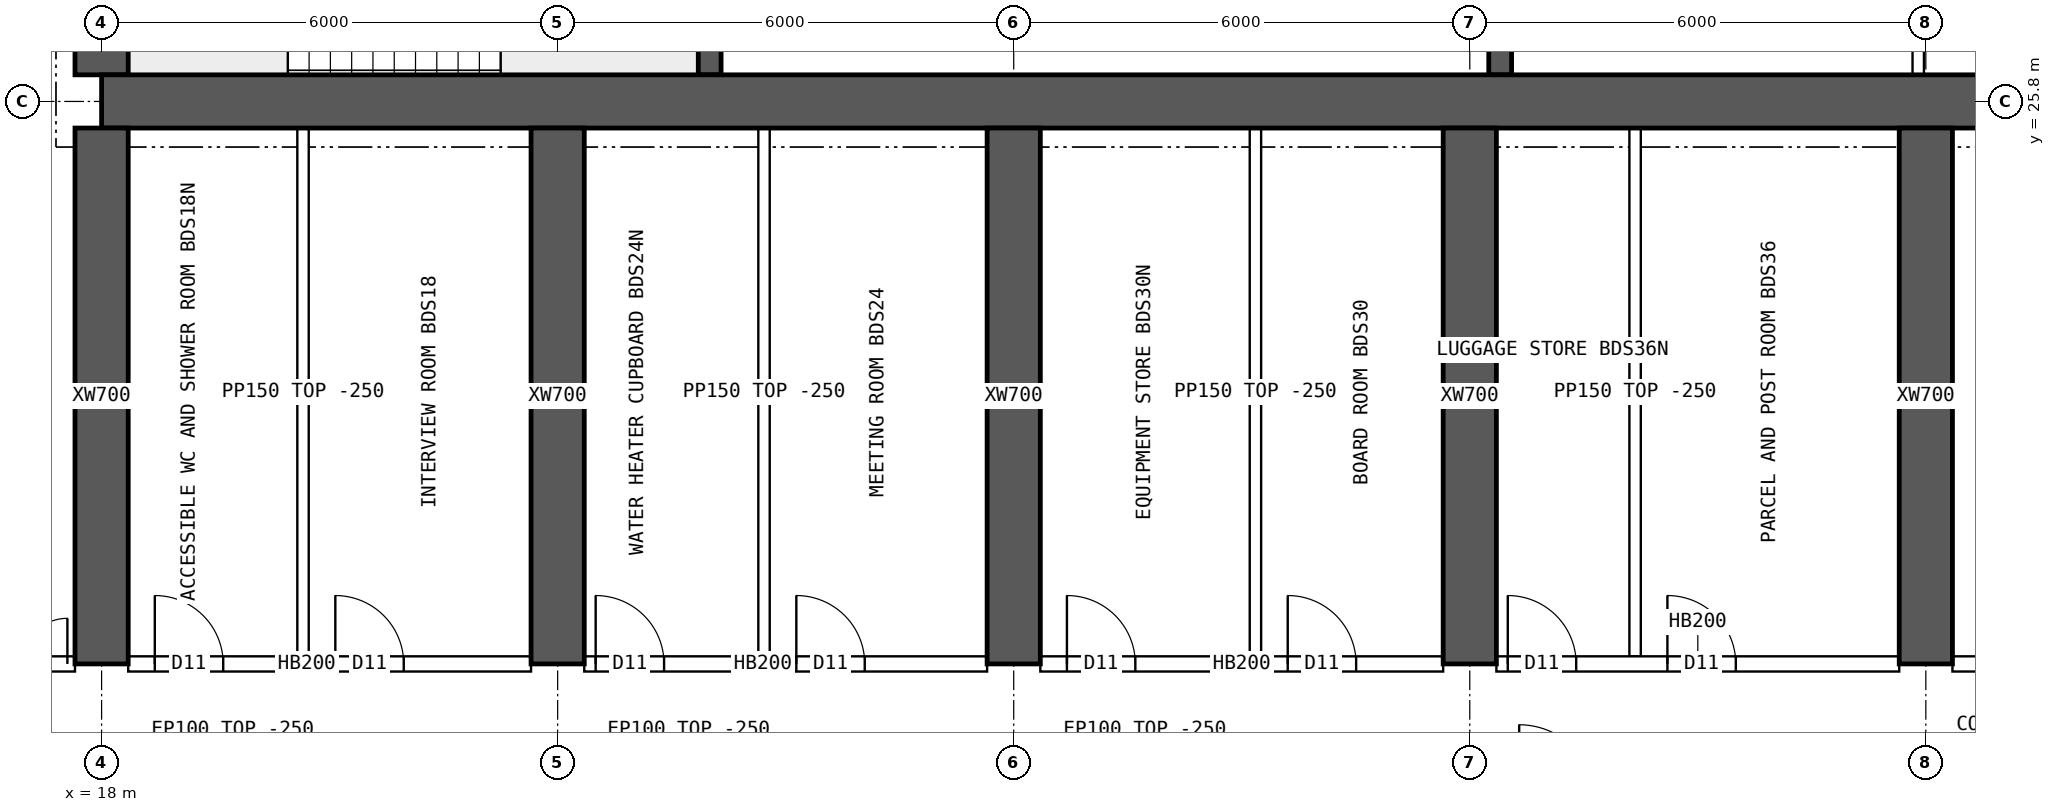
"""IFC4 building model, lengths in metres.
Left out: names, types, materials, properties, quantities, classifications, styles, units other than length and angle.
Written with IfcOpenShell. Run it as: python <this file> out.ifc"""

import sys

from ifc_helpers import new_model, si_unit, direction, frame, frame_2d, origin, place, context, subcontext, project, spatial, rectangle, extrude, element, fill, save


model = new_model("IFC4")
c1 = context("Model", 3, precision=1e-05, world=origin(), true_north=direction((0.0, 1.0)))
c2 = subcontext(c1, "Body", "Model", "MODEL_VIEW")
j1 = project(units=[si_unit("LENGTHUNIT", "METRE"), si_unit("PLANEANGLEUNIT", "RADIAN")], contexts=[c1])
p1 = place(None, origin())
s1 = spatial("IfcSite", under=j1, at=p1, CompositionType="ELEMENT")
p2 = place(p1, origin())
s2 = spatial("IfcBuilding", under=s1, at=p2, CompositionType="ELEMENT")
p3 = place(p2, frame((0.0, 0.0, 235.3)))
s3 = spatial("IfcBuildingStorey", under=s2, at=p3, CompositionType="ELEMENT", Elevation=235.3)
p4 = place(p3, frame((18.0, 25.8, 0.0), z_axis=(0.0, 0.0, 1.0), x_axis=(1.0, 0.0, 0.0)))
e1 = element("IfcWall", 1, at=p4, inside=s3, PredefinedType="SHEAR", context=c2, shape_type="SweptSolid", body=[
    extrude(rectangle(XDim=48.0, YDim=0.7, at=frame_2d((24.0, 0.0))), origin(), (0.0, 0.0, 1.0), 3.75),
])
p5 = place(p3, frame((18.0, 26.15, 0.0), z_axis=(0.0, 0.0, 1.0), x_axis=(0.0, 1.0, 0.0)))
e2 = element("IfcWall", 2, at=p5, inside=s3, PredefinedType="SHEAR", context=c2, shape_type="SweptSolid", body=[
    extrude(rectangle(XDim=11.7, YDim=0.7, at=frame_2d((5.85, 0.0))), origin(), (0.0, 0.0, 1.0), 3.75),
])
p6 = place(p5, frame((5.15, 0.0, 0.0)))
e3 = element("IfcOpeningElement", 3, at=p6, cuts=e2, PredefinedType="OPENING", context=c2, shape_type="SweptSolid", body=[
    extrude(rectangle(XDim=1.2, YDim=2.1, at=frame_2d((0.6, 1.05))), frame((0.0, 0.36, 0.0), z_axis=(0.0, -1.0, 0.0), x_axis=(1.0, 0.0, 0.0)), (0.0, 0.0, 1.0), 0.72),
])
for number, where, z_axis, x_axis in (
    (4, (26.0, 26.15, 0.0), (0.0, 0.0, 1.0), (0.0, 1.0, 0.0)),
    (5, (36.4, 26.15, 0.0), (0.0, 0.0, 1.0), (0.0, 1.0, 0.0)),
):
    element("IfcWall", number, at=place(p3, frame(where, z_axis=z_axis, x_axis=x_axis)), inside=s3, PredefinedType="SHEAR", context=c2, shape_type="SweptSolid", body=[
        extrude(rectangle(XDim=4.1, YDim=0.3, at=frame_2d((2.05, 0.0))), origin(), (0.0, 0.0, 1.0), 3.75),
    ])
for number, where, z_axis, x_axis in (
    (6, (18.0, 18.4, 0.0), (0.0, 0.0, 1.0), (0.0, 1.0, 0.0)),
    (7, (24.0, 18.4, 0.0), (0.0, 0.0, 1.0), (0.0, 1.0, 0.0)),
    (8, (30.0, 18.4, 0.0), (0.0, 0.0, 1.0), (0.0, 1.0, 0.0)),
    (9, (36.0, 18.4, 0.0), (0.0, 0.0, 1.0), (0.0, 1.0, 0.0)),
    (10, (42.0, 18.4, 0.0), (0.0, 0.0, 1.0), (0.0, 1.0, 0.0)),
):
    element("IfcWall", number, at=place(p3, frame(where, z_axis=z_axis, x_axis=x_axis)), inside=s3, PredefinedType="SHEAR", context=c2, shape_type="SweptSolid", body=[
        extrude(rectangle(XDim=7.05, YDim=0.7, at=frame_2d((3.525, 0.0))), origin(), (0.0, 0.0, 1.0), 3.75),
    ])
p7 = place(p3, frame((41.9, 26.15, 0.0), z_axis=(0.0, 0.0, 1.0), x_axis=(0.0, 1.0, 0.0)))
e11 = element("IfcWall", 11, at=p7, inside=s3, PredefinedType="SOLIDWALL", context=c2, shape_type="SweptSolid", body=[
    extrude(rectangle(XDim=4.1, YDim=0.15, at=frame_2d((2.05, 0.0))), origin(), (0.0, 0.0, 1.0), 3.5),
])
p8 = place(p3, frame((15.6, 18.4, 0.0), z_axis=(0.0, 0.0, 1.0), x_axis=(1.0, 0.0, 0.0)))
e12 = element("IfcWall", 12, at=p8, inside=s3, PredefinedType="SOLIDWALL", context=c2, shape_type="SweptSolid", body=[
    extrude(rectangle(XDim=2.05, YDim=0.2, at=frame_2d((1.025, 0.0))), origin(), (0.0, 0.0, 1.0), 3.5),
])
p9 = place(p8, frame((0.75, 0.0, 0.0)))
e13 = element("IfcOpeningElement", 13, at=p9, cuts=e12, PredefinedType="OPENING", context=c2, shape_type="SweptSolid", body=[
    extrude(rectangle(XDim=1.2, YDim=2.1, at=frame_2d((0.6, 1.05))), frame((0.0, 0.11, 0.0), z_axis=(0.0, -1.0, 0.0), x_axis=(1.0, 0.0, 0.0)), (0.0, 0.0, 1.0), 0.22),
])
p10 = place(p3, frame((18.35, 18.4, 0.0), z_axis=(0.0, 0.0, 1.0), x_axis=(1.0, 0.0, 0.0)))
e14 = element("IfcWall", 14, at=p10, inside=s3, PredefinedType="SOLIDWALL", context=c2, shape_type="SweptSolid", body=[
    extrude(rectangle(XDim=5.3, YDim=0.2, at=frame_2d((2.65, 0.0))), origin(), (0.0, 0.0, 1.0), 3.5),
])
p11 = place(p10, frame((0.35, 0.0, 0.0)))
e15 = element("IfcOpeningElement", 15, at=p11, cuts=e14, PredefinedType="OPENING", context=c2, shape_type="SweptSolid", body=[
    extrude(rectangle(XDim=0.9, YDim=2.1, at=frame_2d((0.45, 1.05))), frame((0.0, 0.11, 0.0), z_axis=(0.0, -1.0, 0.0), x_axis=(1.0, 0.0, 0.0)), (0.0, 0.0, 1.0), 0.22),
])
p12 = place(p10, frame((2.725, 0.0, 0.0)))
e16 = element("IfcOpeningElement", 16, at=p12, cuts=e14, PredefinedType="OPENING", context=c2, shape_type="SweptSolid", body=[
    extrude(rectangle(XDim=0.9, YDim=2.1, at=frame_2d((0.45, 1.05))), frame((0.0, 0.11, 0.0), z_axis=(0.0, -1.0, 0.0), x_axis=(1.0, 0.0, 0.0)), (0.0, 0.0, 1.0), 0.22),
])
p13 = place(p3, frame((24.35, 18.4, 0.0), z_axis=(0.0, 0.0, 1.0), x_axis=(1.0, 0.0, 0.0)))
e17 = element("IfcWall", 17, at=p13, inside=s3, PredefinedType="SOLIDWALL", context=c2, shape_type="SweptSolid", body=[
    extrude(rectangle(XDim=5.3, YDim=0.2, at=frame_2d((2.65, 0.0))), origin(), (0.0, 0.0, 1.0), 3.5),
])
p14 = place(p13, frame((0.15, 0.0, 0.0)))
e18 = element("IfcOpeningElement", 18, at=p14, cuts=e17, PredefinedType="OPENING", context=c2, shape_type="SweptSolid", body=[
    extrude(rectangle(XDim=0.9, YDim=2.1, at=frame_2d((0.45, 1.05))), frame((0.0, 0.11, 0.0), z_axis=(0.0, -1.0, 0.0), x_axis=(1.0, 0.0, 0.0)), (0.0, 0.0, 1.0), 0.22),
])
p15 = place(p13, frame((2.79, 0.0, 0.0)))
e19 = element("IfcOpeningElement", 19, at=p15, cuts=e17, PredefinedType="OPENING", context=c2, shape_type="SweptSolid", body=[
    extrude(rectangle(XDim=0.9, YDim=2.1, at=frame_2d((0.45, 1.05))), frame((0.0, 0.11, 0.0), z_axis=(0.0, -1.0, 0.0), x_axis=(1.0, 0.0, 0.0)), (0.0, 0.0, 1.0), 0.22),
])
p16 = place(p3, frame((30.35, 18.4, 0.0), z_axis=(0.0, 0.0, 1.0), x_axis=(1.0, 0.0, 0.0)))
e20 = element("IfcWall", 20, at=p16, inside=s3, PredefinedType="SOLIDWALL", context=c2, shape_type="SweptSolid", body=[
    extrude(rectangle(XDim=5.3, YDim=0.2, at=frame_2d((2.65, 0.0))), origin(), (0.0, 0.0, 1.0), 3.5),
])
p17 = place(p16, frame((0.35, 0.0, 0.0)))
e21 = element("IfcOpeningElement", 21, at=p17, cuts=e20, PredefinedType="OPENING", context=c2, shape_type="SweptSolid", body=[
    extrude(rectangle(XDim=0.9, YDim=2.1, at=frame_2d((0.45, 1.05))), frame((0.0, 0.11, 0.0), z_axis=(0.0, -1.0, 0.0), x_axis=(1.0, 0.0, 0.0)), (0.0, 0.0, 1.0), 0.22),
])
p18 = place(p16, frame((3.255, 0.0, 0.0)))
e22 = element("IfcOpeningElement", 22, at=p18, cuts=e20, PredefinedType="OPENING", context=c2, shape_type="SweptSolid", body=[
    extrude(rectangle(XDim=0.9, YDim=2.1, at=frame_2d((0.45, 1.05))), frame((0.0, 0.11, 0.0), z_axis=(0.0, -1.0, 0.0), x_axis=(1.0, 0.0, 0.0)), (0.0, 0.0, 1.0), 0.22),
])
p19 = place(p3, frame((36.35, 18.4, 0.0), z_axis=(0.0, 0.0, 1.0), x_axis=(1.0, 0.0, 0.0)))
e23 = element("IfcWall", 23, at=p19, inside=s3, PredefinedType="SOLIDWALL", context=c2, shape_type="SweptSolid", body=[
    extrude(rectangle(XDim=5.3, YDim=0.2, at=frame_2d((2.65, 0.0))), origin(), (0.0, 0.0, 1.0), 3.5),
])
p20 = place(p19, frame((0.15, 0.0, 0.0)))
e24 = element("IfcOpeningElement", 24, at=p20, cuts=e23, PredefinedType="OPENING", context=c2, shape_type="SweptSolid", body=[
    extrude(rectangle(XDim=0.9, YDim=2.1, at=frame_2d((0.45, 1.05))), frame((0.0, 0.11, 0.0), z_axis=(0.0, -1.0, 0.0), x_axis=(1.0, 0.0, 0.0)), (0.0, 0.0, 1.0), 0.22),
])
p21 = place(p19, frame((2.25, 0.0, 0.0)))
e25 = element("IfcOpeningElement", 25, at=p21, cuts=e23, PredefinedType="OPENING", context=c2, shape_type="SweptSolid", body=[
    extrude(rectangle(XDim=0.9, YDim=2.1, at=frame_2d((0.45, 1.05))), frame((0.0, 0.11, 0.0), z_axis=(0.0, -1.0, 0.0), x_axis=(1.0, 0.0, 0.0)), (0.0, 0.0, 1.0), 0.22),
])
p22 = place(p3, frame((42.35, 18.4, 0.0), z_axis=(0.0, 0.0, 1.0), x_axis=(1.0, 0.0, 0.0)))
e26 = element("IfcWall", 26, at=p22, inside=s3, PredefinedType="SOLIDWALL", context=c2, shape_type="SweptSolid", body=[
    extrude(rectangle(XDim=5.3, YDim=0.2, at=frame_2d((2.65, 0.0))), origin(), (0.0, 0.0, 1.0), 3.5),
])
p23 = place(p22, frame((0.35, 0.0, 0.0)))
e27 = element("IfcOpeningElement", 27, at=p23, cuts=e26, PredefinedType="OPENING", context=c2, shape_type="SweptSolid", body=[
    extrude(rectangle(XDim=0.9, YDim=2.1, at=frame_2d((0.45, 1.05))), frame((0.0, 0.11, 0.0), z_axis=(0.0, -1.0, 0.0), x_axis=(1.0, 0.0, 0.0)), (0.0, 0.0, 1.0), 0.22),
])
p24 = place(p22, frame((3.96, 0.0, 0.0)))
e28 = element("IfcOpeningElement", 28, at=p24, cuts=e26, PredefinedType="OPENING", context=c2, shape_type="SweptSolid", body=[
    extrude(rectangle(XDim=0.9, YDim=2.1, at=frame_2d((0.45, 1.05))), frame((0.0, 0.11, 0.0), z_axis=(0.0, -1.0, 0.0), x_axis=(1.0, 0.0, 0.0)), (0.0, 0.0, 1.0), 0.22),
])
for number, where, z_axis, x_axis in (
    (29, (20.65, 18.5, 0.0), (0.0, 0.0, 1.0), (0.0, 1.0, 0.0)),
    (30, (26.715, 18.5, 0.0), (0.0, 0.0, 1.0), (0.0, 1.0, 0.0)),
    (31, (33.18, 18.5, 0.0), (0.0, 0.0, 1.0), (0.0, 1.0, 0.0)),
    (32, (38.175, 18.5, 0.0), (0.0, 0.0, 1.0), (0.0, 1.0, 0.0)),
):
    element("IfcWall", number, at=place(p3, frame(where, z_axis=z_axis, x_axis=x_axis)), inside=s3, PredefinedType="PARTITIONING", context=c2, shape_type="SweptSolid", body=[
        extrude(rectangle(XDim=6.95, YDim=0.15, at=frame_2d((3.475, 0.0))), origin(), (0.0, 0.0, 1.0), 3.5),
    ])
p25 = place(p9, origin())
e33 = element("IfcDoor", 33, at=p25, inside=s3, OperationType="DOUBLE_DOOR_SINGLE_SWING", PredefinedType="DOOR", context=c2, shape_type="SweptSolid", body=[
    extrude(rectangle(XDim=1.2, YDim=2.1, at=frame_2d((0.6, 1.05))), frame((0.0, 0.025, 0.0), z_axis=(0.0, -1.0, 0.0), x_axis=(1.0, 0.0, 0.0)), (0.0, 0.0, 1.0), 0.05),
])
fill(e13, e33)
p26 = place(p11, origin())
e34 = element("IfcDoor", 34, at=p26, inside=s3, OperationType="SINGLE_SWING_LEFT", PredefinedType="DOOR", context=c2, shape_type="SweptSolid", body=[
    extrude(rectangle(XDim=0.9, YDim=2.1, at=frame_2d((0.45, 1.05))), frame((0.0, 0.025, 0.0), z_axis=(0.0, -1.0, 0.0), x_axis=(1.0, 0.0, 0.0)), (0.0, 0.0, 1.0), 0.05),
])
fill(e15, e34)
p27 = place(p12, origin())
e35 = element("IfcDoor", 35, at=p27, inside=s3, OperationType="SINGLE_SWING_LEFT", PredefinedType="DOOR", context=c2, shape_type="SweptSolid", body=[
    extrude(rectangle(XDim=0.9, YDim=2.1, at=frame_2d((0.45, 1.05))), frame((0.0, 0.025, 0.0), z_axis=(0.0, -1.0, 0.0), x_axis=(1.0, 0.0, 0.0)), (0.0, 0.0, 1.0), 0.05),
])
fill(e16, e35)
p28 = place(p14, origin())
e36 = element("IfcDoor", 36, at=p28, inside=s3, OperationType="SINGLE_SWING_LEFT", PredefinedType="DOOR", context=c2, shape_type="SweptSolid", body=[
    extrude(rectangle(XDim=0.9, YDim=2.1, at=frame_2d((0.45, 1.05))), frame((0.0, 0.025, 0.0), z_axis=(0.0, -1.0, 0.0), x_axis=(1.0, 0.0, 0.0)), (0.0, 0.0, 1.0), 0.05),
])
fill(e18, e36)
p29 = place(p15, origin())
e37 = element("IfcDoor", 37, at=p29, inside=s3, OperationType="SINGLE_SWING_LEFT", PredefinedType="DOOR", context=c2, shape_type="SweptSolid", body=[
    extrude(rectangle(XDim=0.9, YDim=2.1, at=frame_2d((0.45, 1.05))), frame((0.0, 0.025, 0.0), z_axis=(0.0, -1.0, 0.0), x_axis=(1.0, 0.0, 0.0)), (0.0, 0.0, 1.0), 0.05),
])
fill(e19, e37)
p30 = place(p17, origin())
e38 = element("IfcDoor", 38, at=p30, inside=s3, OperationType="SINGLE_SWING_LEFT", PredefinedType="DOOR", context=c2, shape_type="SweptSolid", body=[
    extrude(rectangle(XDim=0.9, YDim=2.1, at=frame_2d((0.45, 1.05))), frame((0.0, 0.025, 0.0), z_axis=(0.0, -1.0, 0.0), x_axis=(1.0, 0.0, 0.0)), (0.0, 0.0, 1.0), 0.05),
])
fill(e21, e38)
p31 = place(p18, origin())
e39 = element("IfcDoor", 39, at=p31, inside=s3, OperationType="SINGLE_SWING_LEFT", PredefinedType="DOOR", context=c2, shape_type="SweptSolid", body=[
    extrude(rectangle(XDim=0.9, YDim=2.1, at=frame_2d((0.45, 1.05))), frame((0.0, 0.025, 0.0), z_axis=(0.0, -1.0, 0.0), x_axis=(1.0, 0.0, 0.0)), (0.0, 0.0, 1.0), 0.05),
])
fill(e22, e39)
p32 = place(p20, origin())
e40 = element("IfcDoor", 40, at=p32, inside=s3, OperationType="SINGLE_SWING_LEFT", PredefinedType="DOOR", context=c2, shape_type="SweptSolid", body=[
    extrude(rectangle(XDim=0.9, YDim=2.1, at=frame_2d((0.45, 1.05))), frame((0.0, 0.025, 0.0), z_axis=(0.0, -1.0, 0.0), x_axis=(1.0, 0.0, 0.0)), (0.0, 0.0, 1.0), 0.05),
])
fill(e24, e40)
p33 = place(p21, origin())
e41 = element("IfcDoor", 41, at=p33, inside=s3, OperationType="SINGLE_SWING_LEFT", PredefinedType="DOOR", context=c2, shape_type="SweptSolid", body=[
    extrude(rectangle(XDim=0.9, YDim=2.1, at=frame_2d((0.45, 1.05))), frame((0.0, 0.025, 0.0), z_axis=(0.0, -1.0, 0.0), x_axis=(1.0, 0.0, 0.0)), (0.0, 0.0, 1.0), 0.05),
])
fill(e25, e41)
save(model, sys.argv[1])
